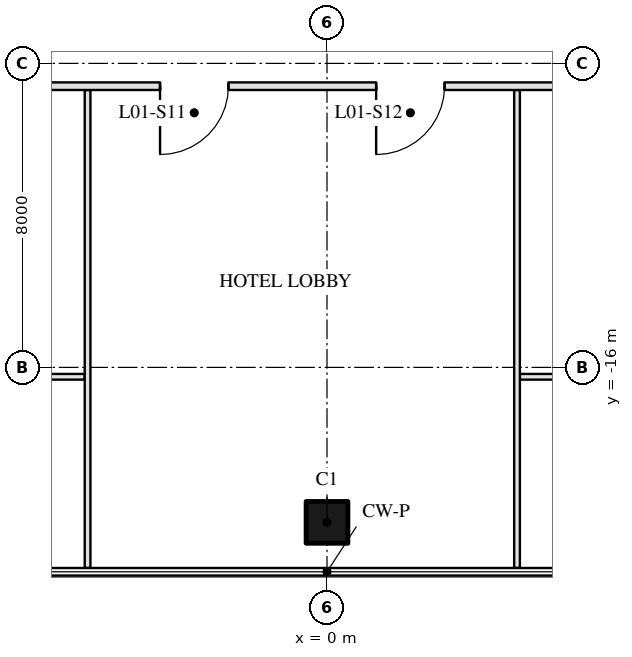
"""IFC4 building model, lengths in metres.
Left out: names, types, materials, properties, quantities, classifications, styles, units other than length and angle.
Written with IfcOpenShell. Run it as: python <this file> out.ifc"""

import sys

from ifc_helpers import new_model, si_unit, direction, frame, frame_2d, origin, origin_2d, place, context, subcontext, project, spatial, rectangle, hollow_rectangle, extrude, boolean, halfspace, element, fill, save


model = new_model("IFC4")
c1 = context("Model", 3, precision=1e-05, world=origin(), true_north=direction((0.0, 1.0)))
c2 = subcontext(c1, "Body", "Model", "MODEL_VIEW")
j1 = project(units=[si_unit("LENGTHUNIT", "METRE"), si_unit("PLANEANGLEUNIT", "RADIAN")], contexts=[c1])
p1 = place(None, origin())
s1 = spatial("IfcSite", under=j1, at=p1, CompositionType="ELEMENT")
p2 = place(p1, origin())
s2 = spatial("IfcBuilding", under=s1, at=p2, CompositionType="ELEMENT")
p3 = place(p2, frame((0.0, 0.0, 9.0)))
s3 = spatial("IfcBuildingStorey", under=s2, at=p3, CompositionType="ELEMENT", Elevation=9.0)
p4 = place(p3, frame((0.0, -20.078, 0.0), z_axis=(0.0, 0.11418220644, 0.993459824921), x_axis=(-1.0, 0.0, 0.0)))
e1 = element("IfcColumn", 1, at=p4, inside=s3, PredefinedType="COLUMN", context=c2, shape_type="SweptSolid", body=[
    boolean("DIFFERENCE", boolean("DIFFERENCE", extrude(hollow_rectangle(XDim=1.1, YDim=1.1, WallThickness=0.05, at=origin_2d()), origin(), (0.0, 0.0, 1.0), 6.543), halfspace(frame((0.0, 0.0, 0.015), z_axis=(0.0, 0.0, 1.0), x_axis=(1.0, 0.0, 0.0)), True)), halfspace(frame((0.0, 0.0, 6.528), z_axis=(0.0, 0.0, 1.0), x_axis=(1.0, 0.0, 0.0)), False)),
])
p5 = place(p3, frame((-17.141, -16.247, 0.0), z_axis=(0.0, 0.0, 1.0), x_axis=(1.0, 0.0, 0.0)))
e2 = element("IfcWall", 2, at=p5, inside=s3, PredefinedType="PARTITIONING", context=c2, shape_type="SweptSolid", body=[
    extrude(rectangle(XDim=10.766, YDim=0.15, at=frame_2d((5.383, 0.0))), origin(), (0.0, 0.0, 1.0), 5.36),
])
p6 = place(p5, frame((4.915, 0.0, 0.0)))
e3 = element("IfcOpeningElement", 3, at=p6, cuts=e2, PredefinedType="OPENING", context=c2, shape_type="SweptSolid", body=[
    extrude(rectangle(XDim=1.0, YDim=2.1, at=frame_2d((0.5, 1.05))), frame((0.0, 0.085, 0.0), z_axis=(0.0, -1.0, 0.0), x_axis=(1.0, 0.0, 0.0)), (0.0, 0.0, 1.0), 0.17),
])
p7 = place(p3, frame((5.075, -16.247, 0.0), z_axis=(0.0, 0.0, 1.0), x_axis=(1.0, 0.0, 0.0)))
e4 = element("IfcWall", 4, at=p7, inside=s3, PredefinedType="PARTITIONING", context=c2, shape_type="SweptSolid", body=[
    extrude(rectangle(XDim=12.066, YDim=0.15, at=frame_2d((6.033, 0.0))), origin(), (0.0, 0.0, 1.0), 5.36),
])
p8 = place(p7, frame((5.501, 0.0, 0.0)))
e5 = element("IfcOpeningElement", 5, at=p8, cuts=e4, PredefinedType="OPENING", context=c2, shape_type="SweptSolid", body=[
    extrude(rectangle(XDim=1.0, YDim=2.1, at=frame_2d((0.5, 1.05))), frame((0.0, 0.085, 0.0), z_axis=(0.0, -1.0, 0.0), x_axis=(1.0, 0.0, 0.0)), (0.0, 0.0, 1.0), 0.17),
])
for number, where, z_axis, x_axis in (
    (6, (-6.3, -21.278, 0.0), (0.0, 0.0, 1.0), (0.0, 1.0, 0.0)),
    (7, (5.0, -21.278, 0.0), (0.0, 0.0, 1.0), (0.0, 1.0, 0.0)),
):
    element("IfcWall", number, at=place(p3, frame(where, z_axis=z_axis, x_axis=x_axis)), inside=s3, PredefinedType="PARTITIONING", context=c2, shape_type="SweptSolid", body=[
        extrude(rectangle(XDim=12.578, YDim=0.15, at=frame_2d((6.289, 0.0))), origin(), (0.0, 0.0, 1.0), 5.55),
    ])
p9 = place(p3, frame((-9.93, -8.6, 0.0), z_axis=(0.0, 0.0, 1.0), x_axis=(1.0, 0.0, 0.0)))
e8 = element("IfcWall", 8, at=p9, inside=s3, PredefinedType="PARTITIONING", context=c2, shape_type="SweptSolid", body=[
    extrude(rectangle(XDim=19.861, YDim=0.2, at=frame_2d((9.93, 0.0))), origin(), (0.0, 0.0, 1.0), 5.36),
])
p10 = place(p9, frame((1.234, 0.0, 0.0)))
e9 = element("IfcOpeningElement", 9, at=p10, cuts=e8, PredefinedType="OPENING", context=c2, shape_type="SweptSolid", body=[
    extrude(rectangle(XDim=1.2, YDim=2.1, at=frame_2d((0.6, 1.05))), frame((0.0, 0.11, 0.0), z_axis=(0.0, -1.0, 0.0), x_axis=(1.0, 0.0, 0.0)), (0.0, 0.0, 1.0), 0.22),
])
p11 = place(p9, frame((5.537, 0.0, 0.0)))
e10 = element("IfcOpeningElement", 10, at=p11, cuts=e8, PredefinedType="OPENING", context=c2, shape_type="SweptSolid", body=[
    extrude(rectangle(XDim=1.8, YDim=2.4, at=frame_2d((0.9, 1.2))), frame((0.0, 0.11, 0.0), z_axis=(0.0, -1.0, 0.0), x_axis=(1.0, 0.0, 0.0)), (0.0, 0.0, 1.0), 0.22),
])
p12 = place(p9, frame((11.224, 0.0, 0.0)))
e11 = element("IfcOpeningElement", 11, at=p12, cuts=e8, PredefinedType="OPENING", context=c2, shape_type="SweptSolid", body=[
    extrude(rectangle(XDim=1.8, YDim=2.4, at=frame_2d((0.9, 1.2))), frame((0.0, 0.11, 0.0), z_axis=(0.0, -1.0, 0.0), x_axis=(1.0, 0.0, 0.0)), (0.0, 0.0, 1.0), 0.22),
])
p13 = place(p9, frame((16.877, 0.0, 0.0)))
e12 = element("IfcOpeningElement", 12, at=p13, cuts=e8, PredefinedType="OPENING", context=c2, shape_type="SweptSolid", body=[
    extrude(rectangle(XDim=1.0, YDim=2.1, at=frame_2d((0.5, 1.05))), frame((0.0, 0.11, 0.0), z_axis=(0.0, -1.0, 0.0), x_axis=(1.0, 0.0, 0.0)), (0.0, 0.0, 1.0), 0.22),
])
p14 = place(p11, frame((1.8, 0.0, 0.0), z_axis=(0.0, 0.0, 1.0), x_axis=(-1.0, 0.0, 0.0)))
e13 = element("IfcDoor", 13, at=p14, inside=s3, OperationType="DOUBLE_DOOR_SINGLE_SWING", PredefinedType="DOOR", context=c2, shape_type="SweptSolid", body=[
    extrude(rectangle(XDim=1.8, YDim=2.4, at=frame_2d((0.9, 1.2))), frame((0.0, 0.025, 0.0), z_axis=(0.0, -1.0, 0.0), x_axis=(1.0, 0.0, 0.0)), (0.0, 0.0, 1.0), 0.05),
])
fill(e10, e13)
p15 = place(p12, frame((1.8, 0.0, 0.0), z_axis=(0.0, 0.0, 1.0), x_axis=(-1.0, 0.0, 0.0)))
e14 = element("IfcDoor", 14, at=p15, inside=s3, OperationType="DOUBLE_DOOR_SINGLE_SWING", PredefinedType="DOOR", context=c2, shape_type="SweptSolid", body=[
    extrude(rectangle(XDim=1.8, YDim=2.4, at=frame_2d((0.9, 1.2))), frame((0.0, 0.025, 0.0), z_axis=(0.0, -1.0, 0.0), x_axis=(1.0, 0.0, 0.0)), (0.0, 0.0, 1.0), 0.05),
])
fill(e11, e14)
save(model, sys.argv[1])
